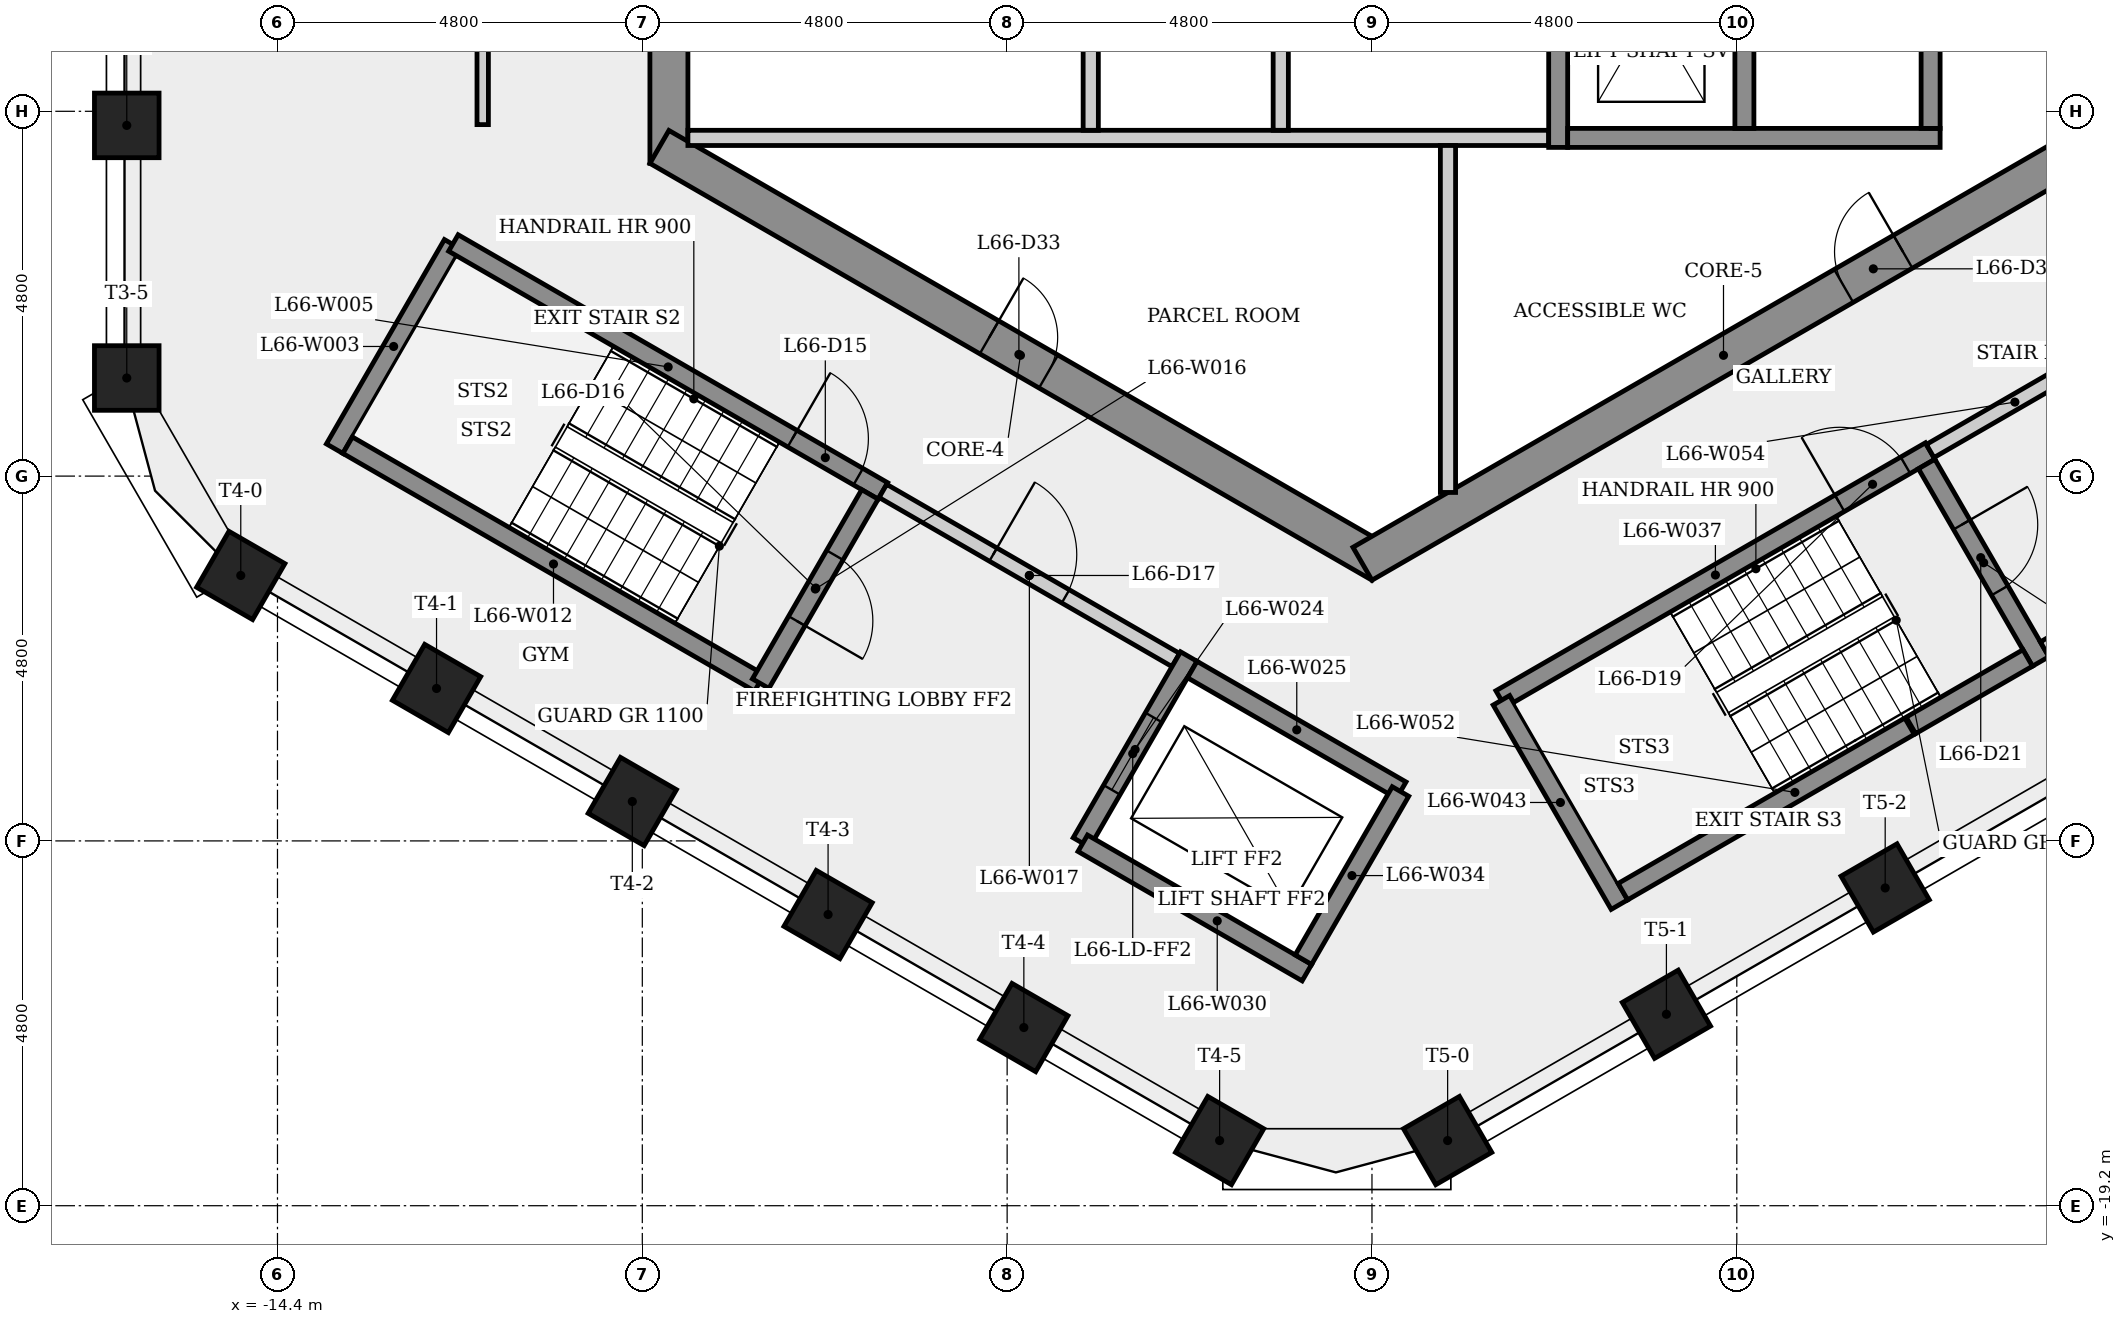
"""IFC4 building model, lengths in metres.
Left out: names, types, materials, properties, quantities, classifications, styles, units other than length and angle.
Written with IfcOpenShell. Run it as: python <this file> out.ifc"""

import sys

from ifc_helpers import new_model, si_unit, direction, frame, frame_2d, origin, origin_2d, place, context, subcontext, project, spatial, rectangle, extrude, element, fill, save


model = new_model("IFC4")
c1 = context("Model", 3, precision=1e-05, world=origin(), true_north=direction((0.0, 1.0)))
c2 = subcontext(c1, "Body", "Model", "MODEL_VIEW")
j1 = project(units=[si_unit("LENGTHUNIT", "METRE"), si_unit("PLANEANGLEUNIT", "RADIAN")], contexts=[c1])
p1 = place(None, origin())
s1 = spatial("IfcSite", under=j1, at=p1, CompositionType="ELEMENT")
p2 = place(p1, origin())
s2 = spatial("IfcBuilding", under=s1, at=p2, CompositionType="ELEMENT")
p3 = place(p2, frame((0.0, 0.0, 246.1)))
s3 = spatial("IfcBuildingStorey", under=s2, at=p3, CompositionType="ELEMENT", Elevation=246.1)
p4 = place(p3, frame((-9.25, 5.485, 0.0), z_axis=(0.0, 0.0, 1.0), x_axis=(0.0, -1.0, 0.0)))
e1 = element("IfcWall", 1, at=p4, inside=s3, PredefinedType="SHEAR", context=c2, shape_type="SweptSolid", body=[
    extrude(rectangle(XDim=10.97, YDim=0.5, at=frame_2d((5.485, 0.0))), origin(), (0.0, 0.0, 1.0), 3.4),
])
p5 = place(p4, frame((8.51, 0.0, 0.0)))
e2 = element("IfcOpeningElement", 2, at=p5, cuts=e1, PredefinedType="OPENING", context=c2, shape_type="SweptSolid", body=[
    extrude(rectangle(XDim=0.9, YDim=2.1, at=frame_2d((0.45, 1.05))), frame((0.0, 0.26, 0.0), z_axis=(0.0, -1.0, 0.0), x_axis=(1.0, 0.0, 0.0)), (0.0, 0.0, 1.0), 0.52),
])
p6 = place(p4, frame((4.685, 0.0, 0.0)))
e3 = element("IfcOpeningElement", 3, at=p6, cuts=e1, PredefinedType="OPENING", context=c2, shape_type="SweptSolid", body=[
    extrude(rectangle(XDim=1.6, YDim=2.1, at=frame_2d((0.8, 1.05))), frame((0.0, 0.26, 0.0), z_axis=(0.0, -1.0, 0.0), x_axis=(1.0, 0.0, 0.0)), (0.0, 0.0, 1.0), 0.52),
])
p7 = place(p3, frame((-9.375, -5.268, 0.0), z_axis=(0.0, 0.0, 1.0), x_axis=(0.866023993627, -0.500002442456, 0.0)))
e4 = element("IfcWall", 4, at=p7, inside=s3, PredefinedType="SHEAR", context=c2, shape_type="SweptSolid", body=[
    extrude(rectangle(XDim=10.97, YDim=0.5, at=frame_2d((5.485, 0.0))), origin(), (0.0, 0.0, 1.0), 3.4),
])
p8 = place(p7, frame((5.011, 0.0, 0.0)))
e5 = element("IfcOpeningElement", 5, at=p8, cuts=e4, PredefinedType="OPENING", context=c2, shape_type="SweptSolid", body=[
    extrude(rectangle(XDim=0.9, YDim=2.1, at=frame_2d((0.45, 1.05))), frame((0.0, 0.26, 0.0), z_axis=(0.0, -1.0, 0.0), x_axis=(1.0, 0.0, 0.0)), (0.0, 0.0, 1.0), 0.52),
])
p9 = place(p3, frame((-0.125, -10.753, 0.0), z_axis=(0.0, 0.0, 1.0), x_axis=(0.866023993627, 0.500002442456, 0.0)))
e6 = element("IfcWall", 6, at=p9, inside=s3, PredefinedType="SHEAR", context=c2, shape_type="SweptSolid", body=[
    extrude(rectangle(XDim=10.97, YDim=0.5, at=frame_2d((5.485, 0.0))), origin(), (0.0, 0.0, 1.0), 3.4),
])
p10 = place(p9, frame((7.311, 0.0, 0.0)))
e7 = element("IfcOpeningElement", 7, at=p10, cuts=e6, PredefinedType="OPENING", context=c2, shape_type="SweptSolid", body=[
    extrude(rectangle(XDim=0.9, YDim=2.1, at=frame_2d((0.45, 1.05))), frame((0.0, 0.26, 0.0), z_axis=(0.0, -1.0, 0.0), x_axis=(1.0, 0.0, 0.0)), (0.0, 0.0, 1.0), 0.52),
])
for number, where, z_axis, x_axis in (
    (8, (-16.383, -4.986, 0.0), (0.0, 0.0, 1.0), (-1.0, 0.0, 0.0)),
    (9, (-16.383, -8.309, 0.0), (0.0, 0.0, 1.0), (-1.0, 0.0, 0.0)),
    (10, (-14.883, -10.907, 0.0), (0.0, 0.0, 1.0), (-0.5, -0.866, 0.0)),
    (11, (-12.307, -12.394, 0.0), (0.0, 0.0, 1.0), (-0.5, -0.866, 0.0)),
    (12, (-9.732, -13.881, 0.0), (0.0, 0.0, 1.0), (-0.5, -0.866, 0.0)),
    (13, (-7.156, -15.369, 0.0), (0.0, 0.0, 1.0), (-0.5, -0.866, 0.0)),
    (14, (-4.58, -16.856, 0.0), (0.0, 0.0, 1.0), (-0.5, -0.866, 0.0)),
    (15, (-2.004, -18.343, 0.0), (0.0, 0.0, 1.0), (-0.5, -0.866, 0.0)),
    (16, (0.996, -18.343, 0.0), (0.0, 0.0, 1.0), (0.5, -0.866, 0.0)),
    (17, (3.874, -16.681, 0.0), (0.0, 0.0, 1.0), (0.5, -0.866, 0.0)),
    (18, (6.752, -15.019, 0.0), (0.0, 0.0, 1.0), (0.5, -0.866, 0.0)),
):
    element("IfcColumn", number, at=place(p3, frame(where, z_axis=z_axis, x_axis=x_axis)), inside=s3, PredefinedType="COLUMN", context=c2, shape_type="SweptSolid", body=[
        extrude(rectangle(XDim=0.85, YDim=0.85, at=origin_2d()), origin(), (0.0, 0.0, 1.0), 3.4),
    ])
p11 = place(p3, frame((-13.648, -9.239, 0.0), z_axis=(0.0, 0.0, 1.0), x_axis=(0.500003782172, 0.866023220135, 0.0)))
e19 = element("IfcWall", 19, at=p11, inside=s3, PredefinedType="SHEAR", context=c2, shape_type="SweptSolid", body=[
    extrude(rectangle(XDim=3.105, YDim=0.25, at=frame_2d((1.552, 0.0))), origin(), (0.0, 0.0, 1.0), 3.05),
])
p12 = place(p3, frame((-12.085, -6.532, 0.0), z_axis=(0.0, 0.0, 1.0), x_axis=(0.866031063448, -0.499990197047, 0.0)))
e20 = element("IfcWall", 20, at=p12, inside=s3, PredefinedType="SHEAR", context=c2, shape_type="SweptSolid", body=[
    extrude(rectangle(XDim=6.525, YDim=0.25, at=frame_2d((3.263, 0.0))), origin(), (0.0, 0.0, 1.0), 3.05),
])
p13 = place(p12, frame((5.15, 0.0, 0.0)))
e21 = element("IfcOpeningElement", 21, at=p13, cuts=e20, PredefinedType="OPENING", context=c2, shape_type="SweptSolid", body=[
    extrude(rectangle(XDim=1.0, YDim=2.1, at=frame_2d((0.5, 1.05))), frame((0.0, 0.135, 0.0), z_axis=(0.0, -1.0, 0.0), x_axis=(1.0, 0.0, 0.0)), (0.0, 0.0, 1.0), 0.27),
])
p14 = place(p3, frame((-11.7, -4.975, 0.0), z_axis=(0.0, 0.0, 1.0), x_axis=(0.0, 1.0, 0.0)))
e22 = element("IfcWall", 22, at=p14, inside=s3, PredefinedType="PARTITIONING", context=c2, shape_type="SweptSolid", body=[
    extrude(rectangle(XDim=10.025, YDim=0.15, at=frame_2d((5.013, 0.0))), origin(), (0.0, 0.0, 1.0), 3.05),
])
p15 = place(p14, frame((4.475, 0.0, 0.0)))
e23 = element("IfcOpeningElement", 23, at=p15, cuts=e22, PredefinedType="OPENING", context=c2, shape_type="SweptSolid", body=[
    extrude(rectangle(XDim=1.0, YDim=2.1, at=frame_2d((0.5, 1.05))), frame((0.0, 0.085, 0.0), z_axis=(0.0, -1.0, 0.0), x_axis=(1.0, 0.0, 0.0)), (0.0, 0.0, 1.0), 0.17),
])
p16 = place(p3, frame((-9.0, -5.15, 0.0), z_axis=(0.0, 0.0, 1.0), x_axis=(1.0, 0.0, 0.0)))
e24 = element("IfcWall", 24, at=p16, inside=s3, PredefinedType="PARTITIONING", context=c2, shape_type="SweptSolid", body=[
    extrude(rectangle(XDim=11.325, YDim=0.2, at=frame_2d((5.663, 0.0))), origin(), (0.0, 0.0, 1.0), 3.05),
])
p17 = place(p3, frame((-8.06, -12.321, 0.0), z_axis=(0.0, 0.0, 1.0), x_axis=(-0.866029591389, 0.499992746786, 0.0)))
e25 = element("IfcWall", 25, at=p17, inside=s3, PredefinedType="SHEAR", context=c2, shape_type="SweptSolid", body=[
    extrude(rectangle(XDim=6.255, YDim=0.25, at=frame_2d((3.127, 0.0))), origin(), (0.0, 0.0, 1.0), 3.05),
])
p18 = place(p3, frame((-6.605, -9.841, 0.0), z_axis=(0.0, 0.0, 1.0), x_axis=(-0.500011588718, -0.866018712932, 0.0)))
e26 = element("IfcWall", 26, at=p18, inside=s3, PredefinedType="SHEAR", context=c2, shape_type="SweptSolid", body=[
    extrude(rectangle(XDim=2.875, YDim=0.25, at=frame_2d((1.438, 0.0))), origin(), (0.0, 0.0, 1.0), 3.05),
])
p19 = place(p18, frame((0.923, 0.0, 0.0)))
e27 = element("IfcOpeningElement", 27, at=p19, cuts=e26, PredefinedType="OPENING", context=c2, shape_type="SweptSolid", body=[
    extrude(rectangle(XDim=1.0, YDim=2.1, at=frame_2d((0.5, 1.05))), frame((0.0, 0.135, 0.0), z_axis=(0.0, -1.0, 0.0), x_axis=(1.0, 0.0, 0.0)), (0.0, 0.0, 1.0), 0.27),
])
p20 = place(p3, frame((-6.435, -9.795, 0.0), z_axis=(0.0, 0.0, 1.0), x_axis=(0.866012907634, -0.500021643343, 0.0)))
e28 = element("IfcWall", 28, at=p20, inside=s3, PredefinedType="PARTITIONING", context=c2, shape_type="SweptSolid", body=[
    extrude(rectangle(XDim=4.45, YDim=0.2, at=frame_2d((2.225, 0.0))), origin(), (0.0, 0.0, 1.0), 3.05),
])
p21 = place(p20, frame((1.675, 0.0, 0.0)))
e29 = element("IfcOpeningElement", 29, at=p21, cuts=e28, PredefinedType="OPENING", context=c2, shape_type="SweptSolid", body=[
    extrude(rectangle(XDim=1.1, YDim=2.1, at=frame_2d((0.55, 1.05))), frame((0.0, 0.11, 0.0), z_axis=(0.0, -1.0, 0.0), x_axis=(1.0, 0.0, 0.0)), (0.0, 0.0, 1.0), 0.22),
])
p22 = place(p3, frame((-3.7, -1.9, 0.0), z_axis=(0.0, 0.0, 1.0), x_axis=(0.0, -1.0, 0.0)))
e30 = element("IfcWall", 30, at=p22, inside=s3, PredefinedType="PARTITIONING", context=c2, shape_type="SweptSolid", body=[
    extrude(rectangle(XDim=3.15, YDim=0.2, at=frame_2d((1.575, 0.0))), origin(), (0.0, 0.0, 1.0), 3.05),
])
p23 = place(p3, frame((-2.41, -11.974, 0.0), z_axis=(0.0, 0.0, 1.0), x_axis=(-0.49998675294, -0.866033051843, 0.0)))
e31 = element("IfcWall", 31, at=p23, inside=s3, PredefinedType="SHEAR", context=c2, shape_type="SweptSolid", body=[
    extrude(rectangle(XDim=2.825, YDim=0.25, at=frame_2d((1.413, 0.0))), origin(), (0.0, 0.0, 1.0), 3.05),
])
p24 = place(p23, frame((0.926, 0.0, 0.0)))
e32 = element("IfcOpeningElement", 32, at=p24, cuts=e31, PredefinedType="OPENING", context=c2, shape_type="SweptSolid", body=[
    extrude(rectangle(XDim=1.1, YDim=2.1, at=frame_2d((0.55, 1.05))), frame((0.0, 0.135, 0.0), z_axis=(0.0, -1.0, 0.0), x_axis=(1.0, 0.0, 0.0)), (0.0, 0.0, 1.0), 0.27),
])
p25 = place(p3, frame((-2.364, -12.145, 0.0), z_axis=(0.0, 0.0, 1.0), x_axis=(0.866048579423, -0.499959856469, 0.0)))
e33 = element("IfcWall", 33, at=p25, inside=s3, PredefinedType="SHEAR", context=c2, shape_type="SweptSolid", body=[
    extrude(rectangle(XDim=3.175, YDim=0.25, at=frame_2d((1.587, 0.0))), origin(), (0.0, 0.0, 1.0), 3.4),
])
p26 = place(p3, frame((-1.2, -1.9, 0.0), z_axis=(0.0, 0.0, 1.0), x_axis=(0.0, -1.0, 0.0)))
e34 = element("IfcWall", 34, at=p26, inside=s3, PredefinedType="PARTITIONING", context=c2, shape_type="SweptSolid", body=[
    extrude(rectangle(XDim=3.15, YDim=0.2, at=frame_2d((1.575, 0.0))), origin(), (0.0, 0.0, 1.0), 3.05),
])
p27 = place(p3, frame((-0.856, -16.133, 0.0), z_axis=(0.0, 0.0, 1.0), x_axis=(-0.866032748241, 0.499987278812, 0.0)))
e35 = element("IfcWall", 35, at=p27, inside=s3, PredefinedType="SHEAR", context=c2, shape_type="SweptSolid", body=[
    extrude(rectangle(XDim=3.405, YDim=0.25, at=frame_2d((1.702, 0.0))), origin(), (0.0, 0.0, 1.0), 3.05),
])
p28 = place(p3, frame((0.375, -13.75, 0.0), z_axis=(0.0, 0.0, 1.0), x_axis=(-0.50003400563, -0.866005769735, 0.0)))
e36 = element("IfcWall", 36, at=p28, inside=s3, PredefinedType="SHEAR", context=c2, shape_type="SweptSolid", body=[
    extrude(rectangle(XDim=2.555, YDim=0.25, at=frame_2d((1.277, 0.0))), origin(), (0.0, 0.0, 1.0), 3.4),
])
p29 = place(p3, frame((1.0, -5.25, 0.0), z_axis=(0.0, 0.0, 1.0), x_axis=(0.0, -1.0, 0.0)))
e37 = element("IfcWall", 37, at=p29, inside=s3, PredefinedType="PARTITIONING", context=c2, shape_type="SweptSolid", body=[
    extrude(rectangle(XDim=4.565, YDim=0.2, at=frame_2d((2.282, 0.0))), origin(), (0.0, 0.0, 1.0), 3.05),
])
p30 = place(p3, frame((1.693, -12.532, 0.0), z_axis=(0.0, 0.0, 1.0), x_axis=(0.866031063448, 0.499990197047, 0.0)))
e38 = element("IfcWall", 38, at=p30, inside=s3, PredefinedType="SHEAR", context=c2, shape_type="SweptSolid", body=[
    extrude(rectangle(XDim=6.525, YDim=0.25, at=frame_2d((3.263, 0.0))), origin(), (0.0, 0.0, 1.0), 3.05),
])
p31 = place(p30, frame((5.15, 0.0, 0.0)))
e39 = element("IfcOpeningElement", 39, at=p31, cuts=e38, PredefinedType="OPENING", context=c2, shape_type="SweptSolid", body=[
    extrude(rectangle(XDim=1.0, YDim=2.1, at=frame_2d((0.5, 1.05))), frame((0.0, 0.135, 0.0), z_axis=(0.0, -1.0, 0.0), x_axis=(1.0, 0.0, 0.0)), (0.0, 0.0, 1.0), 0.27),
])
p32 = place(p3, frame((2.45, -5.275, 0.0), z_axis=(0.0, 0.0, 1.0), x_axis=(0.0, 1.0, 0.0)))
e40 = element("IfcWall", 40, at=p32, inside=s3, PredefinedType="SHEAR", context=c2, shape_type="SweptSolid", body=[
    extrude(rectangle(XDim=3.6, YDim=0.25, at=frame_2d((1.8, 0.0))), origin(), (0.0, 0.0, 1.0), 3.05),
])
p33 = place(p3, frame((3.256, -15.239, 0.0), z_axis=(0.0, 0.0, 1.0), x_axis=(-0.500003782172, 0.866023220135, 0.0)))
e41 = element("IfcWall", 41, at=p33, inside=s3, PredefinedType="SHEAR", context=c2, shape_type="SweptSolid", body=[
    extrude(rectangle(XDim=3.105, YDim=0.25, at=frame_2d((1.552, 0.0))), origin(), (0.0, 0.0, 1.0), 3.05),
])
p34 = place(p3, frame((2.575, -5.15, 0.0), z_axis=(0.0, 0.0, 1.0), x_axis=(1.0, 0.0, 0.0)))
e42 = element("IfcWall", 42, at=p34, inside=s3, PredefinedType="SHEAR", context=c2, shape_type="SweptSolid", body=[
    extrude(rectangle(XDim=4.9, YDim=0.25, at=frame_2d((2.45, 0.0))), origin(), (0.0, 0.0, 1.0), 3.05),
])
p35 = place(p3, frame((4.9, -1.925, 0.0), z_axis=(0.0, 0.0, 1.0), x_axis=(0.0, -1.0, 0.0)))
e43 = element("IfcWall", 43, at=p35, inside=s3, PredefinedType="SHEAR", context=c2, shape_type="SweptSolid", body=[
    extrude(rectangle(XDim=3.1, YDim=0.25, at=frame_2d((1.55, 0.0))), origin(), (0.0, 0.0, 1.0), 3.4),
])
p36 = place(p3, frame((7.073, -12.891, 0.0), z_axis=(0.0, 0.0, 1.0), x_axis=(-0.866023145199, -0.500003911965, 0.0)))
e44 = element("IfcWall", 44, at=p36, inside=s3, PredefinedType="SHEAR", context=c2, shape_type="SweptSolid", body=[
    extrude(rectangle(XDim=4.355, YDim=0.25, at=frame_2d((2.177, 0.0))), origin(), (0.0, 0.0, 1.0), 3.05),
])
p37 = place(p3, frame((7.298, -9.441, 0.0), z_axis=(0.0, 0.0, 1.0), x_axis=(0.50002537861, -0.866010750942, 0.0)))
e45 = element("IfcWall", 45, at=p37, inside=s3, PredefinedType="SHEAR", context=c2, shape_type="SweptSolid", body=[
    extrude(rectangle(XDim=3.0, YDim=0.25, at=frame_2d((1.5, 0.0))), origin(), (0.0, 0.0, 1.0), 3.05),
])
p38 = place(p37, frame((0.923, 0.0, 0.0)))
e46 = element("IfcOpeningElement", 46, at=p38, cuts=e45, PredefinedType="OPENING", context=c2, shape_type="SweptSolid", body=[
    extrude(rectangle(XDim=1.0, YDim=2.1, at=frame_2d((0.5, 1.05))), frame((0.0, 0.135, 0.0), z_axis=(0.0, -1.0, 0.0), x_axis=(1.0, 0.0, 0.0)), (0.0, 0.0, 1.0), 0.27),
])
p39 = place(p3, frame((7.344, -9.27, 0.0), z_axis=(0.0, 0.0, 1.0), x_axis=(0.866005588531, 0.500034319456, 0.0)))
e47 = element("IfcWall", 47, at=p39, inside=s3, PredefinedType="PARTITIONING", context=c2, shape_type="SweptSolid", body=[
    extrude(rectangle(XDim=2.575, YDim=0.2, at=frame_2d((1.288, 0.0))), origin(), (0.0, 0.0, 1.0), 3.05),
])
p40 = place(p3, frame((7.35, -1.925, 0.0), z_axis=(0.0, 0.0, 1.0), x_axis=(0.0, -1.0, 0.0)))
e48 = element("IfcWall", 48, at=p40, inside=s3, PredefinedType="SHEAR", context=c2, shape_type="SweptSolid", body=[
    extrude(rectangle(XDim=3.1, YDim=0.25, at=frame_2d((1.55, 0.0))), origin(), (0.0, 0.0, 1.0), 3.4),
])
p41 = place(p3, frame((8.627, -11.993, 0.0), z_axis=(0.0, 0.0, 1.0), x_axis=(-0.866059624469, -0.499940723351, 0.0)))
e49 = element("IfcWall", 49, at=p41, inside=s3, PredefinedType="SHEAR", context=c2, shape_type="SweptSolid", body=[
    extrude(rectangle(XDim=1.775, YDim=0.25, at=frame_2d((0.888, 0.0))), origin(), (0.0, 0.0, 1.0), 3.05),
])
p42 = place(p3, frame((10.901, -10.681, 0.0), z_axis=(0.0, 0.0, 1.0), x_axis=(-0.866007538022, -0.500030943131, 0.0)))
e50 = element("IfcWall", 50, at=p42, inside=s3, PredefinedType="PARTITIONING", context=c2, shape_type="SweptSolid", body=[
    extrude(rectangle(XDim=2.375, YDim=0.2, at=frame_2d((1.188, 0.0))), origin(), (0.0, 0.0, 1.0), 3.05),
])
p43 = place(p13, origin())
e51 = element("IfcDoor", 51, at=p43, inside=s3, OperationType="SINGLE_SWING_LEFT", PredefinedType="DOOR", context=c2, shape_type="SweptSolid", body=[
    extrude(rectangle(XDim=1.0, YDim=2.1, at=frame_2d((0.5, 1.05))), frame((0.0, 0.025, 0.0), z_axis=(0.0, -1.0, 0.0), x_axis=(1.0, 0.0, 0.0)), (0.0, 0.0, 1.0), 0.05),
])
fill(e21, e51)
p44 = place(p19, origin())
e52 = element("IfcDoor", 52, at=p44, inside=s3, OperationType="SINGLE_SWING_RIGHT", PredefinedType="DOOR", context=c2, shape_type="SweptSolid", body=[
    extrude(rectangle(XDim=1.0, YDim=2.1, at=frame_2d((0.5, 1.05))), frame((0.0, 0.025, 0.0), z_axis=(0.0, -1.0, 0.0), x_axis=(1.0, 0.0, 0.0)), (0.0, 0.0, 1.0), 0.05),
])
fill(e27, e52)
p45 = place(p21, origin())
e53 = element("IfcDoor", 53, at=p45, inside=s3, OperationType="SINGLE_SWING_LEFT", PredefinedType="DOOR", context=c2, shape_type="SweptSolid", body=[
    extrude(rectangle(XDim=1.1, YDim=2.1, at=frame_2d((0.55, 1.05))), frame((0.0, 0.025, 0.0), z_axis=(0.0, -1.0, 0.0), x_axis=(1.0, 0.0, 0.0)), (0.0, 0.0, 1.0), 0.05),
])
fill(e29, e53)
p46 = place(p24, origin())
e54 = element("IfcDoor", 54, at=p46, inside=s3, OperationType="SLIDING_TO_LEFT", PredefinedType="DOOR", context=c2, shape_type="SweptSolid", body=[
    extrude(rectangle(XDim=1.1, YDim=2.1, at=frame_2d((0.55, 1.05))), frame((0.0, 0.025, 0.0), z_axis=(0.0, -1.0, 0.0), x_axis=(1.0, 0.0, 0.0)), (0.0, 0.0, 1.0), 0.05),
])
fill(e32, e54)
p47 = place(p31, origin())
e55 = element("IfcDoor", 55, at=p47, inside=s3, OperationType="SINGLE_SWING_LEFT", PredefinedType="DOOR", context=c2, shape_type="SweptSolid", body=[
    extrude(rectangle(XDim=1.0, YDim=2.1, at=frame_2d((0.5, 1.05))), frame((0.0, 0.025, 0.0), z_axis=(0.0, -1.0, 0.0), x_axis=(1.0, 0.0, 0.0)), (0.0, 0.0, 1.0), 0.05),
])
fill(e39, e55)
p48 = place(p38, origin())
e56 = element("IfcDoor", 56, at=p48, inside=s3, OperationType="SINGLE_SWING_LEFT", PredefinedType="DOOR", context=c2, shape_type="SweptSolid", body=[
    extrude(rectangle(XDim=1.0, YDim=2.1, at=frame_2d((0.5, 1.05))), frame((0.0, 0.025, 0.0), z_axis=(0.0, -1.0, 0.0), x_axis=(1.0, 0.0, 0.0)), (0.0, 0.0, 1.0), 0.05),
])
fill(e46, e56)
p49 = place(p8, origin())
e57 = element("IfcDoor", 57, at=p49, inside=s3, OperationType="SINGLE_SWING_LEFT", PredefinedType="DOOR", context=c2, shape_type="SweptSolid", body=[
    extrude(rectangle(XDim=0.9, YDim=2.1, at=frame_2d((0.45, 1.05))), frame((0.0, 0.025, 0.0), z_axis=(0.0, -1.0, 0.0), x_axis=(1.0, 0.0, 0.0)), (0.0, 0.0, 1.0), 0.05),
])
fill(e5, e57)
p50 = place(p10, origin())
e58 = element("IfcDoor", 58, at=p50, inside=s3, OperationType="SINGLE_SWING_RIGHT", PredefinedType="DOOR", context=c2, shape_type="SweptSolid", body=[
    extrude(rectangle(XDim=0.9, YDim=2.1, at=frame_2d((0.45, 1.05))), frame((0.0, 0.025, 0.0), z_axis=(0.0, -1.0, 0.0), x_axis=(1.0, 0.0, 0.0)), (0.0, 0.0, 1.0), 0.05),
])
fill(e7, e58)
save(model, sys.argv[1])
